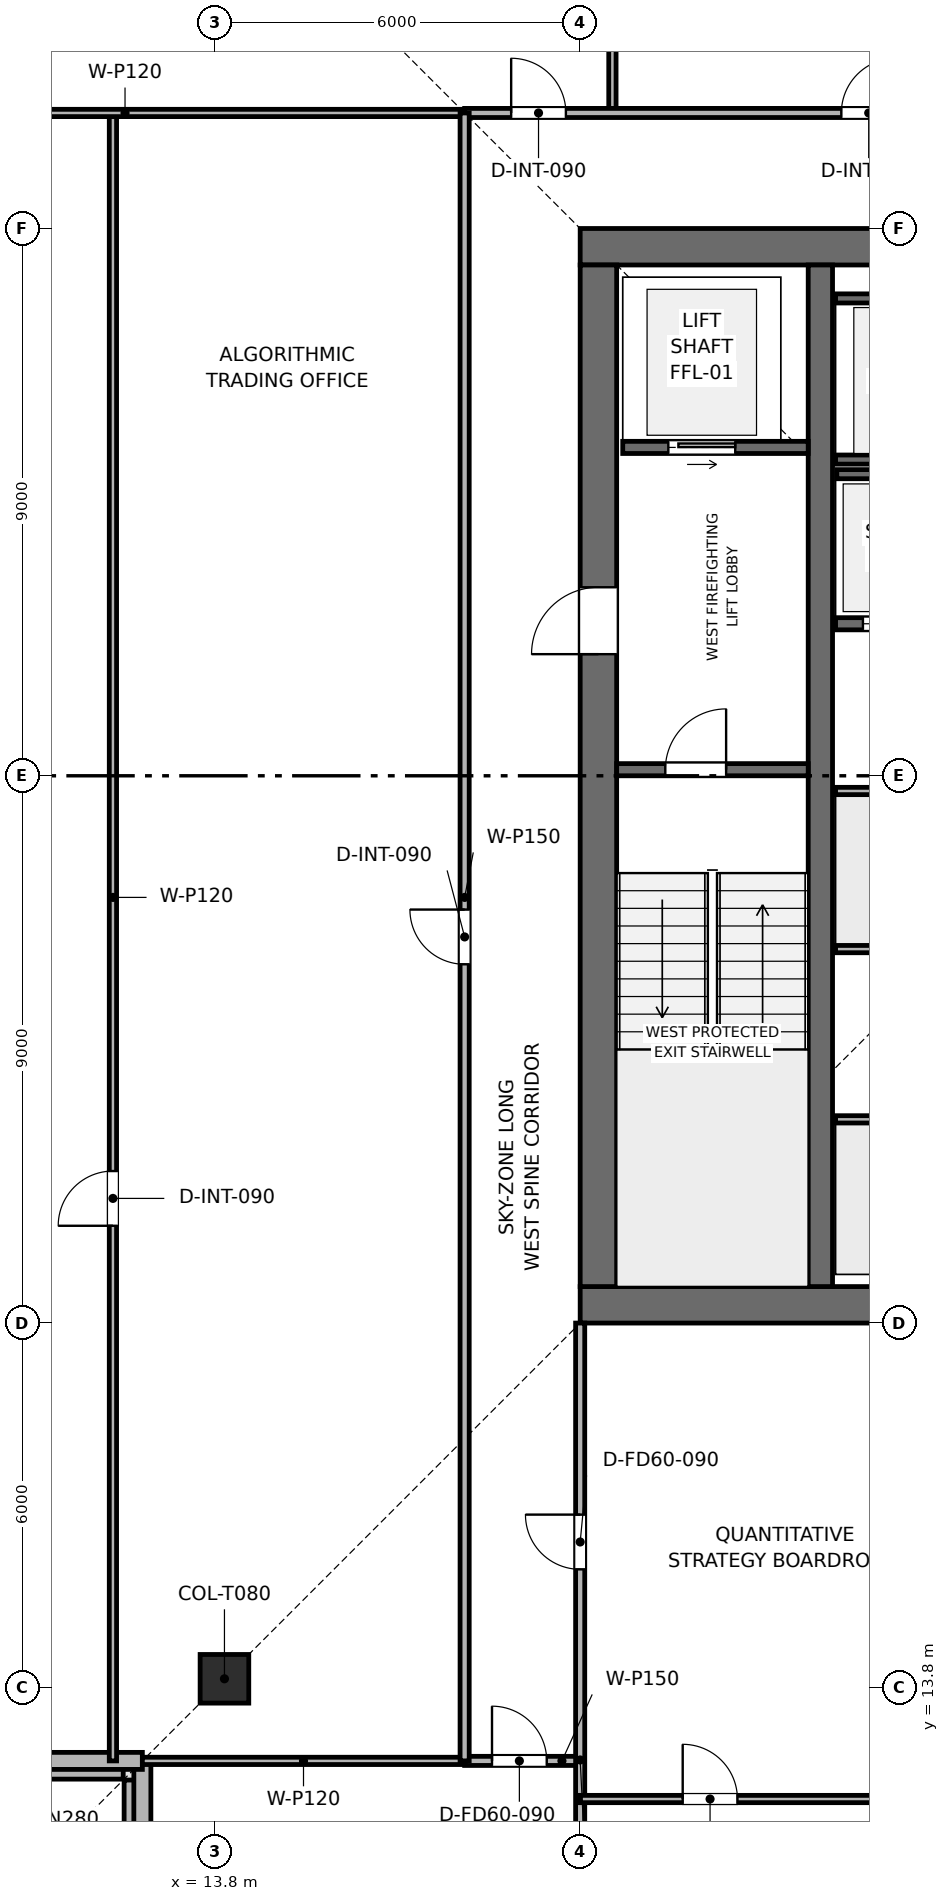
"""IFC4 building model, lengths in metres.
Left out: names, types, materials, properties, quantities, classifications, styles, units other than length and angle.
Written with IfcOpenShell. Run it as: python <this file> out.ifc"""

import sys

from ifc_helpers import new_model, si_unit, direction, frame, frame_2d, origin, origin_2d, place, context, subcontext, project, spatial, rectangle, extrude, element, fill, save


model = new_model("IFC4")
c1 = context("Model", 3, precision=1e-05, world=origin(), true_north=direction((0.0, 1.0)))
c2 = subcontext(c1, "Body", "Model", "MODEL_VIEW")
j1 = project(units=[si_unit("LENGTHUNIT", "METRE"), si_unit("PLANEANGLEUNIT", "RADIAN")], contexts=[c1])
p1 = place(None, origin())
s1 = spatial("IfcSite", under=j1, at=p1, CompositionType="ELEMENT")
p2 = place(p1, origin())
s2 = spatial("IfcBuilding", under=s1, at=p2, CompositionType="ELEMENT")
p3 = place(p2, frame((0.0, 0.0, 333.0)))
s3 = spatial("IfcBuildingStorey", under=s2, at=p3, CompositionType="ELEMENT", Elevation=333.0)
p4 = place(p3, frame((19.8, 20.1, 0.0), z_axis=(0.0, 0.0, 1.0), x_axis=(1.0, 0.0, 0.0)))
e1 = element("IfcWall", 1, at=p4, inside=s3, PredefinedType="SHEAR", context=c2, shape_type="SweptSolid", body=[
    extrude(rectangle(XDim=18.0, YDim=0.6, at=frame_2d((9.0, 0.0))), origin(), (0.0, 0.0, 1.0), 3.75),
])
p5 = place(p3, frame((19.8, 37.5, 0.0), z_axis=(0.0, 0.0, 1.0), x_axis=(1.0, 0.0, 0.0)))
e2 = element("IfcWall", 2, at=p5, inside=s3, PredefinedType="SHEAR", context=c2, shape_type="SweptSolid", body=[
    extrude(rectangle(XDim=18.0, YDim=0.6, at=frame_2d((9.0, 0.0))), origin(), (0.0, 0.0, 1.0), 3.75),
])
p6 = place(p5, frame((7.05, 0.0, 0.0)))
e3 = element("IfcOpeningElement", 3, at=p6, cuts=e2, PredefinedType="OPENING", context=c2, shape_type="SweptSolid", body=[
    extrude(rectangle(XDim=1.1, YDim=2.15, at=frame_2d((0.55, 1.075))), frame((0.0, 0.31, 0.0), z_axis=(0.0, -1.0, 0.0), x_axis=(1.0, 0.0, 0.0)), (0.0, 0.0, 1.0), 0.62),
])
p7 = place(p3, frame((20.1, 20.4, 0.0), z_axis=(0.0, 0.0, 1.0), x_axis=(0.0, 1.0, 0.0)))
e4 = element("IfcWall", 4, at=p7, inside=s3, PredefinedType="SHEAR", context=c2, shape_type="SweptSolid", body=[
    extrude(rectangle(XDim=16.8, YDim=0.6, at=frame_2d((8.4, 0.0))), origin(), (0.0, 0.0, 1.0), 3.75),
])
p8 = place(p7, frame((10.4, 0.0, 0.0)))
e5 = element("IfcOpeningElement", 5, at=p8, cuts=e4, PredefinedType="OPENING", context=c2, shape_type="SweptSolid", body=[
    extrude(rectangle(XDim=1.1, YDim=2.15, at=frame_2d((0.55, 1.075))), frame((0.0, 0.31, 0.0), z_axis=(0.0, -1.0, 0.0), x_axis=(1.0, 0.0, 0.0)), (0.0, 0.0, 1.0), 0.62),
])
p9 = place(p3, frame((23.75, 20.4, 0.0), z_axis=(0.0, 0.0, 1.0), x_axis=(0.0, 1.0, 0.0)))
e6 = element("IfcWall", 6, at=p9, inside=s3, PredefinedType="SHEAR", context=c2, shape_type="SweptSolid", body=[
    extrude(rectangle(XDim=16.8, YDim=0.4, at=frame_2d((8.4, 0.0))), origin(), (0.0, 0.0, 1.0), 3.75),
])
p10 = place(p3, frame((13.95, 13.95, 0.003), z_axis=(0.0, 0.0, 1.0), x_axis=(1.0, 0.0, 0.0)))
e7 = element("IfcColumn", 7, at=p10, inside=s3, PredefinedType="COLUMN", context=c2, shape_type="SweptSolid", body=[
    extrude(rectangle(XDim=0.8, YDim=0.8, at=origin_2d()), origin(), (0.0, 0.0, 1.0), 3.504),
])
for number, where, z_axis, x_axis in (
    (8, (6.255, 12.42, 0.0), (0.0, 0.0, 1.0), (1.0, 0.0, 0.0)),
    (9, (12.42, 12.285, 0.0), (0.0, 0.0, 1.0), (0.0, -1.0, 0.0)),
):
    element("IfcWall", number, at=place(p3, frame(where, z_axis=z_axis, x_axis=x_axis)), inside=s3, PredefinedType="PARAPET", context=c2, shape_type="SweptSolid", body=[
        extrude(rectangle(XDim=6.03, YDim=0.24, at=frame_2d((3.015, 0.0))), origin(), (0.0, 0.0, 1.0), 1.2),
    ])
p11 = place(p3, frame((12.6, 6.73, 0.0), z_axis=(0.0, 0.0, 1.0), x_axis=(0.0, 1.0, 0.0)))
e10 = element("IfcWall", 10, at=p11, inside=s3, PredefinedType="SOLIDWALL", context=c2, shape_type="SweptSolid", body=[
    extrude(rectangle(XDim=5.87, YDim=0.28, at=frame_2d((2.935, 0.0))), origin(), (0.0, 0.0, 1.0), 3.51),
])
p12 = place(p11, frame((1.685, 0.0, 0.9)))
e11 = element("IfcOpeningElement", 11, at=p12, cuts=e10, PredefinedType="OPENING", context=c2, shape_type="SweptSolid", body=[
    extrude(rectangle(XDim=2.5, YDim=1.9, at=frame_2d((1.25, 0.95))), frame((0.0, 0.15, 0.0), z_axis=(0.0, -1.0, 0.0), x_axis=(1.0, 0.0, 0.0)), (0.0, 0.0, 1.0), 0.3),
])
p13 = place(p3, frame((12.6, 12.6, 0.0), z_axis=(0.0, 0.0, 1.0), x_axis=(-1.0, 0.0, 0.0)))
e12 = element("IfcWall", 12, at=p13, inside=s3, PredefinedType="SOLIDWALL", context=c2, shape_type="SweptSolid", body=[
    extrude(rectangle(XDim=5.87, YDim=0.28, at=frame_2d((2.935, 0.0))), origin(), (0.0, 0.0, 1.0), 3.51),
])
p14 = place(p13, frame((1.685, 0.0, 0.9)))
e13 = element("IfcOpeningElement", 13, at=p14, cuts=e12, PredefinedType="OPENING", context=c2, shape_type="SweptSolid", body=[
    extrude(rectangle(XDim=2.5, YDim=1.9, at=frame_2d((1.25, 0.95))), frame((0.0, 0.15, 0.0), z_axis=(0.0, -1.0, 0.0), x_axis=(1.0, 0.0, 0.0)), (0.0, 0.0, 1.0), 0.3),
])
p15 = place(p3, frame((20.4, 28.9, 0.0), z_axis=(0.0, 0.0, 1.0), x_axis=(1.0, 0.0, 0.0)))
e14 = element("IfcWall", 14, at=p15, inside=s3, PredefinedType="SHEAR", context=c2, shape_type="SweptSolid", body=[
    extrude(rectangle(XDim=3.15, YDim=0.2, at=frame_2d((1.575, 0.0))), origin(), (0.0, 0.0, 1.0), 3.51),
])
p16 = place(p15, frame((0.8, 0.0, 0.0)))
e15 = element("IfcOpeningElement", 15, at=p16, cuts=e14, PredefinedType="OPENING", context=c2, shape_type="SweptSolid", body=[
    extrude(rectangle(XDim=1.0, YDim=2.1, at=frame_2d((0.5, 1.05))), frame((0.0, 0.11, 0.0), z_axis=(0.0, -1.0, 0.0), x_axis=(1.0, 0.0, 0.0)), (0.0, 0.0, 1.0), 0.22),
])
p17 = place(p3, frame((20.5, 34.2, 0.0), z_axis=(0.0, 0.0, 1.0), x_axis=(1.0, 0.0, 0.0)))
e16 = element("IfcWall", 16, at=p17, inside=s3, PredefinedType="SHEAR", context=c2, shape_type="SweptSolid", body=[
    extrude(rectangle(XDim=3.05, YDim=0.2, at=frame_2d((1.525, 0.0))), origin(), (0.0, 0.0, 1.0), 3.51),
])
p18 = place(p17, frame((0.75, 0.0, 0.0)))
e17 = element("IfcOpeningElement", 17, at=p18, cuts=e16, PredefinedType="OPENING", context=c2, shape_type="SweptSolid", body=[
    extrude(rectangle(XDim=1.1, YDim=2.15, at=frame_2d((0.55, 1.075))), frame((0.0, 0.11, 0.0), z_axis=(0.0, -1.0, 0.0), x_axis=(1.0, 0.0, 0.0)), (0.0, 0.0, 1.0), 0.22),
])
for number, where, z_axis, x_axis in (
    (18, (24.0, 34.0, 0.0), (0.0, 0.0, 1.0), (1.0, 0.0, 0.0)),
    (19, (24.0, 36.65, 0.0), (0.0, 0.0, 1.0), (1.0, 0.0, 0.0)),
):
    element("IfcWall", number, at=place(p3, frame(where, z_axis=z_axis, x_axis=x_axis)), inside=s3, PredefinedType="SHEAR", context=c2, shape_type="SweptSolid", body=[
        extrude(rectangle(XDim=2.48, YDim=0.15, at=frame_2d((1.24, 0.0))), origin(), (0.0, 0.0, 1.0), 3.51),
    ])
p19 = place(p3, frame((24.0, 31.3, 0.0), z_axis=(0.0, 0.0, 1.0), x_axis=(1.0, 0.0, 0.0)))
e20 = element("IfcWall", 20, at=p19, inside=s3, PredefinedType="SHEAR", context=c2, shape_type="SweptSolid", body=[
    extrude(rectangle(XDim=2.0, YDim=0.2, at=frame_2d((1.0, 0.0))), origin(), (0.0, 0.0, 1.0), 3.51),
])
p20 = place(p19, frame((0.45, 0.0, 0.0)))
e21 = element("IfcOpeningElement", 21, at=p20, cuts=e20, PredefinedType="OPENING", context=c2, shape_type="SweptSolid", body=[
    extrude(rectangle(XDim=1.1, YDim=2.15, at=frame_2d((0.55, 1.075))), frame((0.0, 0.11, 0.0), z_axis=(0.0, -1.0, 0.0), x_axis=(1.0, 0.0, 0.0)), (0.0, 0.0, 1.0), 0.22),
])
p21 = place(p3, frame((24.02, 33.76, 0.0), z_axis=(0.0, 0.0, 1.0), x_axis=(1.0, 0.0, 0.0)))
e22 = element("IfcWall", 22, at=p21, inside=s3, PredefinedType="SHEAR", context=c2, shape_type="SweptSolid", body=[
    extrude(rectangle(XDim=4.08, YDim=0.15, at=frame_2d((2.04, 0.0))), origin(), (0.0, 0.0, 1.0), 3.51),
])
p22 = place(p3, frame((24.0, 23.15, 0.0), z_axis=(0.0, 0.0, 1.0), x_axis=(1.0, 0.0, 0.0)))
e23 = element("IfcWall", 23, at=p22, inside=s3, PredefinedType="PARTITIONING", context=c2, shape_type="SweptSolid", body=[
    extrude(rectangle(XDim=4.05, YDim=0.12, at=frame_2d((2.025, 0.0))), origin(), (0.0, 0.0, 1.0), 3.51),
])
p23 = place(p22, frame((1.575, 0.0, 0.0)))
e24 = element("IfcOpeningElement", 24, at=p23, cuts=e23, PredefinedType="OPENING", context=c2, shape_type="SweptSolid", body=[
    extrude(rectangle(XDim=0.9, YDim=2.1, at=frame_2d((0.45, 1.05))), frame((0.0, 0.07, 0.0), z_axis=(0.0, -1.0, 0.0), x_axis=(1.0, 0.0, 0.0)), (0.0, 0.0, 1.0), 0.14),
])
p24 = place(p3, frame((24.0, 25.95, 0.0), z_axis=(0.0, 0.0, 1.0), x_axis=(1.0, 0.0, 0.0)))
e25 = element("IfcWall", 25, at=p24, inside=s3, PredefinedType="PARTITIONING", context=c2, shape_type="SweptSolid", body=[
    extrude(rectangle(XDim=4.05, YDim=0.12, at=frame_2d((2.025, 0.0))), origin(), (0.0, 0.0, 1.0), 3.51),
])
p25 = place(p24, frame((1.575, 0.0, 0.0)))
e26 = element("IfcOpeningElement", 26, at=p25, cuts=e25, PredefinedType="OPENING", context=c2, shape_type="SweptSolid", body=[
    extrude(rectangle(XDim=0.9, YDim=2.1, at=frame_2d((0.45, 1.05))), frame((0.0, 0.07, 0.0), z_axis=(0.0, -1.0, 0.0), x_axis=(1.0, 0.0, 0.0)), (0.0, 0.0, 1.0), 0.14),
])
p26 = place(p3, frame((24.0, 28.55, 0.0), z_axis=(0.0, 0.0, 1.0), x_axis=(1.0, 0.0, 0.0)))
e27 = element("IfcWall", 27, at=p26, inside=s3, PredefinedType="PARTITIONING", context=c2, shape_type="SweptSolid", body=[
    extrude(rectangle(XDim=4.05, YDim=0.12, at=frame_2d((2.025, 0.0))), origin(), (0.0, 0.0, 1.0), 3.51),
])
p27 = place(p3, frame((20.33, 39.7, 0.0), z_axis=(0.0, 0.0, 1.0), x_axis=(0.0, 1.0, 0.0)))
e28 = element("IfcWall", 28, at=p27, inside=s3, PredefinedType="PARTITIONING", context=c2, shape_type="SweptSolid", body=[
    extrude(rectangle(XDim=11.17, YDim=0.12, at=frame_2d((5.585, 0.0))), origin(), (0.0, 0.0, 1.0), 3.095),
])
p28 = place(p3, frame((12.116, 12.6, 0.0), z_axis=(0.0, 0.0, 1.0), x_axis=(0.0, 1.0, 0.0)))
e29 = element("IfcWall", 29, at=p28, inside=s3, PredefinedType="PARTITIONING", context=c2, shape_type="SweptSolid", body=[
    extrude(rectangle(XDim=27.1, YDim=0.12, at=frame_2d((13.55, 0.0))), origin(), (0.0, 0.0, 1.0), 3.095),
])
p29 = place(p28, frame((8.8, 0.0, 0.0)))
e30 = element("IfcOpeningElement", 30, at=p29, cuts=e29, PredefinedType="OPENING", context=c2, shape_type="SweptSolid", body=[
    extrude(rectangle(XDim=0.9, YDim=2.1, at=frame_2d((0.45, 1.05))), frame((0.0, 0.07, 0.0), z_axis=(0.0, -1.0, 0.0), x_axis=(1.0, 0.0, 0.0)), (0.0, 0.0, 1.0), 0.14),
])
p30 = place(p3, frame((12.6, 12.6, 0.0), z_axis=(0.0, 0.0, 1.0), x_axis=(1.0, 0.0, 0.0)))
e31 = element("IfcWall", 31, at=p30, inside=s3, PredefinedType="PARTITIONING", context=c2, shape_type="SweptSolid", body=[
    extrude(rectangle(XDim=5.3, YDim=0.12, at=frame_2d((2.65, 0.0))), origin(), (0.0, 0.0, 1.0), 3.195),
])
p31 = place(p3, frame((17.9, 12.6, 0.0), z_axis=(0.0, 0.0, 1.0), x_axis=(1.0, 0.0, 0.0)))
e32 = element("IfcWall", 32, at=p31, inside=s3, PredefinedType="PARTITIONING", context=c2, shape_type="SweptSolid", body=[
    extrude(rectangle(XDim=1.9, YDim=0.15, at=frame_2d((0.95, 0.0))), origin(), (0.0, 0.0, 1.0), 3.51),
])
p32 = place(p31, frame((0.45, 0.0, 0.0)))
e33 = element("IfcOpeningElement", 33, at=p32, cuts=e32, PredefinedType="OPENING", context=c2, shape_type="SweptSolid", body=[
    extrude(rectangle(XDim=0.9, YDim=2.1, at=frame_2d((0.45, 1.05))), frame((0.0, 0.085, 0.0), z_axis=(0.0, -1.0, 0.0), x_axis=(1.0, 0.0, 0.0)), (0.0, 0.0, 1.0), 0.17),
])
p33 = place(p3, frame((19.8, 6.73, 0.0), z_axis=(0.0, 0.0, 1.0), x_axis=(0.0, 1.0, 0.0)))
e34 = element("IfcWall", 34, at=p33, inside=s3, PredefinedType="PARTITIONING", context=c2, shape_type="SweptSolid", body=[
    extrude(rectangle(XDim=13.07, YDim=0.15, at=frame_2d((6.535, 0.0))), origin(), (0.0, 0.0, 1.0), 3.095),
])
p34 = place(p33, frame((9.02, 0.0, 0.0)))
e35 = element("IfcOpeningElement", 35, at=p34, cuts=e34, PredefinedType="OPENING", context=c2, shape_type="SweptSolid", body=[
    extrude(rectangle(XDim=0.9, YDim=2.1, at=frame_2d((0.45, 1.05))), frame((0.0, 0.085, 0.0), z_axis=(0.0, -1.0, 0.0), x_axis=(1.0, 0.0, 0.0)), (0.0, 0.0, 1.0), 0.17),
])
p35 = place(p3, frame((19.8, 11.973, 0.0), z_axis=(0.0, 0.0, 1.0), x_axis=(1.0, 0.0, 0.0)))
e36 = element("IfcWall", 36, at=p35, inside=s3, PredefinedType="PARTITIONING", context=c2, shape_type="SweptSolid", body=[
    extrude(rectangle(XDim=7.244, YDim=0.12, at=frame_2d((3.622, 0.0))), origin(), (0.0, 0.0, 1.0), 3.095),
])
p36 = place(p35, frame((1.686, 0.0, 0.0)))
e37 = element("IfcOpeningElement", 37, at=p36, cuts=e36, PredefinedType="OPENING", context=c2, shape_type="SweptSolid", body=[
    extrude(rectangle(XDim=0.9, YDim=2.1, at=frame_2d((0.45, 1.05))), frame((0.0, 0.07, 0.0), z_axis=(0.0, -1.0, 0.0), x_axis=(1.0, 0.0, 0.0)), (0.0, 0.0, 1.0), 0.14),
])
p37 = place(p3, frame((6.73, 39.7, 0.0), z_axis=(0.0, 0.0, 1.0), x_axis=(1.0, 0.0, 0.0)))
e38 = element("IfcWall", 38, at=p37, inside=s3, PredefinedType="PARTITIONING", context=c2, shape_type="SweptSolid", body=[
    extrude(rectangle(XDim=11.17, YDim=0.12, at=frame_2d((5.585, 0.0))), origin(), (0.0, 0.0, 1.0), 3.095),
])
p38 = place(p3, frame((17.9, 39.7, 0.0), z_axis=(0.0, 0.0, 1.0), x_axis=(1.0, 0.0, 0.0)))
e39 = element("IfcWall", 39, at=p38, inside=s3, PredefinedType="PARTITIONING", context=c2, shape_type="SweptSolid", body=[
    extrude(rectangle(XDim=21.8, YDim=0.15, at=frame_2d((10.9, 0.0))), origin(), (0.0, 0.0, 1.0), 3.095),
])
p39 = place(p38, frame((0.765, 0.0, 0.0)))
e40 = element("IfcOpeningElement", 40, at=p39, cuts=e39, PredefinedType="OPENING", context=c2, shape_type="SweptSolid", body=[
    extrude(rectangle(XDim=0.9, YDim=2.1, at=frame_2d((0.45, 1.05))), frame((0.0, 0.085, 0.0), z_axis=(0.0, -1.0, 0.0), x_axis=(1.0, 0.0, 0.0)), (0.0, 0.0, 1.0), 0.17),
])
p40 = place(p38, frame((6.195, 0.0, 0.0)))
e41 = element("IfcOpeningElement", 41, at=p40, cuts=e39, PredefinedType="OPENING", context=c2, shape_type="SweptSolid", body=[
    extrude(rectangle(XDim=0.9, YDim=2.1, at=frame_2d((0.45, 1.05))), frame((0.0, 0.085, 0.0), z_axis=(0.0, -1.0, 0.0), x_axis=(1.0, 0.0, 0.0)), (0.0, 0.0, 1.0), 0.17),
])
p41 = place(p38, frame((15.88, 0.0, 0.0)))
e42 = element("IfcOpeningElement", 42, at=p41, cuts=e39, PredefinedType="OPENING", context=c2, shape_type="SweptSolid", body=[
    extrude(rectangle(XDim=0.9, YDim=2.1, at=frame_2d((0.45, 1.05))), frame((0.0, 0.085, 0.0), z_axis=(0.0, -1.0, 0.0), x_axis=(1.0, 0.0, 0.0)), (0.0, 0.0, 1.0), 0.17),
])
p42 = place(p3, frame((17.9, 12.6, 0.0), z_axis=(0.0, 0.0, 1.0), x_axis=(0.0, 1.0, 0.0)))
e43 = element("IfcWall", 43, at=p42, inside=s3, PredefinedType="PARTITIONING", context=c2, shape_type="SweptSolid", body=[
    extrude(rectangle(XDim=27.1, YDim=0.15, at=frame_2d((13.55, 0.0))), origin(), (0.0, 0.0, 1.0), 3.095),
])
p43 = place(p42, frame((13.1, 0.0, 0.0)))
e44 = element("IfcOpeningElement", 44, at=p43, cuts=e43, PredefinedType="OPENING", context=c2, shape_type="SweptSolid", body=[
    extrude(rectangle(XDim=0.9, YDim=2.1, at=frame_2d((0.45, 1.05))), frame((0.0, 0.085, 0.0), z_axis=(0.0, -1.0, 0.0), x_axis=(1.0, 0.0, 0.0)), (0.0, 0.0, 1.0), 0.17),
])
p44 = place(p16, origin())
e45 = element("IfcDoor", 45, at=p44, inside=s3, OperationType="SINGLE_SWING_RIGHT", PredefinedType="DOOR", context=c2, shape_type="SweptSolid", body=[
    extrude(rectangle(XDim=1.0, YDim=2.1, at=frame_2d((0.5, 1.05))), frame((0.0, 0.025, 0.0), z_axis=(0.0, -1.0, 0.0), x_axis=(1.0, 0.0, 0.0)), (0.0, 0.0, 1.0), 0.05),
])
fill(e15, e45)
p45 = place(p18, origin())
e46 = element("IfcDoor", 46, at=p45, inside=s3, OperationType="SLIDING_TO_RIGHT", PredefinedType="DOOR", context=c2, shape_type="SweptSolid", body=[
    extrude(rectangle(XDim=1.1, YDim=2.15, at=frame_2d((0.55, 1.075))), frame((0.0, 0.025, 0.0), z_axis=(0.0, -1.0, 0.0), x_axis=(1.0, 0.0, 0.0)), (0.0, 0.0, 1.0), 0.05),
])
fill(e17, e46)
p46 = place(p20, origin())
e47 = element("IfcDoor", 47, at=p46, inside=s3, OperationType="SLIDING_TO_RIGHT", PredefinedType="DOOR", context=c2, shape_type="SweptSolid", body=[
    extrude(rectangle(XDim=1.1, YDim=2.15, at=frame_2d((0.55, 1.075))), frame((0.0, 0.025, 0.0), z_axis=(0.0, -1.0, 0.0), x_axis=(1.0, 0.0, 0.0)), (0.0, 0.0, 1.0), 0.05),
])
fill(e21, e47)
p47 = place(p29, origin())
e48 = element("IfcDoor", 48, at=p47, inside=s3, OperationType="SINGLE_SWING_LEFT", PredefinedType="DOOR", context=c2, shape_type="SweptSolid", body=[
    extrude(rectangle(XDim=0.9, YDim=2.1, at=frame_2d((0.45, 1.05))), frame((0.0, 0.025, 0.0), z_axis=(0.0, -1.0, 0.0), x_axis=(1.0, 0.0, 0.0)), (0.0, 0.0, 1.0), 0.05),
])
fill(e30, e48)
p48 = place(p32, origin())
e49 = element("IfcDoor", 49, at=p48, inside=s3, OperationType="SINGLE_SWING_LEFT", PredefinedType="DOOR", context=c2, shape_type="SweptSolid", body=[
    extrude(rectangle(XDim=0.9, YDim=2.1, at=frame_2d((0.45, 1.05))), frame((0.0, 0.025, 0.0), z_axis=(0.0, -1.0, 0.0), x_axis=(1.0, 0.0, 0.0)), (0.0, 0.0, 1.0), 0.05),
])
fill(e33, e49)
p49 = place(p34, origin())
e50 = element("IfcDoor", 50, at=p49, inside=s3, OperationType="SINGLE_SWING_RIGHT", PredefinedType="DOOR", context=c2, shape_type="SweptSolid", body=[
    extrude(rectangle(XDim=0.9, YDim=2.1, at=frame_2d((0.45, 1.05))), frame((0.0, 0.025, 0.0), z_axis=(0.0, -1.0, 0.0), x_axis=(1.0, 0.0, 0.0)), (0.0, 0.0, 1.0), 0.05),
])
fill(e35, e50)
p50 = place(p36, origin())
e51 = element("IfcDoor", 51, at=p50, inside=s3, OperationType="SINGLE_SWING_LEFT", PredefinedType="DOOR", context=c2, shape_type="SweptSolid", body=[
    extrude(rectangle(XDim=0.9, YDim=2.1, at=frame_2d((0.45, 1.05))), frame((0.0, 0.025, 0.0), z_axis=(0.0, -1.0, 0.0), x_axis=(1.0, 0.0, 0.0)), (0.0, 0.0, 1.0), 0.05),
])
fill(e37, e51)
p51 = place(p39, origin())
e52 = element("IfcDoor", 52, at=p51, inside=s3, OperationType="SINGLE_SWING_LEFT", PredefinedType="DOOR", context=c2, shape_type="SweptSolid", body=[
    extrude(rectangle(XDim=0.9, YDim=2.1, at=frame_2d((0.45, 1.05))), frame((0.0, 0.025, 0.0), z_axis=(0.0, -1.0, 0.0), x_axis=(1.0, 0.0, 0.0)), (0.0, 0.0, 1.0), 0.05),
])
fill(e40, e52)
p52 = place(p40, origin())
e53 = element("IfcDoor", 53, at=p52, inside=s3, OperationType="SINGLE_SWING_RIGHT", PredefinedType="DOOR", context=c2, shape_type="SweptSolid", body=[
    extrude(rectangle(XDim=0.9, YDim=2.1, at=frame_2d((0.45, 1.05))), frame((0.0, 0.025, 0.0), z_axis=(0.0, -1.0, 0.0), x_axis=(1.0, 0.0, 0.0)), (0.0, 0.0, 1.0), 0.05),
])
fill(e41, e53)
p53 = place(p43, origin())
e54 = element("IfcDoor", 54, at=p53, inside=s3, OperationType="SINGLE_SWING_RIGHT", PredefinedType="DOOR", context=c2, shape_type="SweptSolid", body=[
    extrude(rectangle(XDim=0.9, YDim=2.1, at=frame_2d((0.45, 1.05))), frame((0.0, 0.025, 0.0), z_axis=(0.0, -1.0, 0.0), x_axis=(1.0, 0.0, 0.0)), (0.0, 0.0, 1.0), 0.05),
])
fill(e44, e54)
p54 = place(p8, origin())
e55 = element("IfcDoor", 55, at=p54, inside=s3, OperationType="SINGLE_SWING_LEFT", PredefinedType="DOOR", context=c2, shape_type="SweptSolid", body=[
    extrude(rectangle(XDim=1.1, YDim=2.15, at=frame_2d((0.55, 1.075))), frame((0.0, 0.025, 0.0), z_axis=(0.0, -1.0, 0.0), x_axis=(1.0, 0.0, 0.0)), (0.0, 0.0, 1.0), 0.05),
])
fill(e5, e55)
save(model, sys.argv[1])
